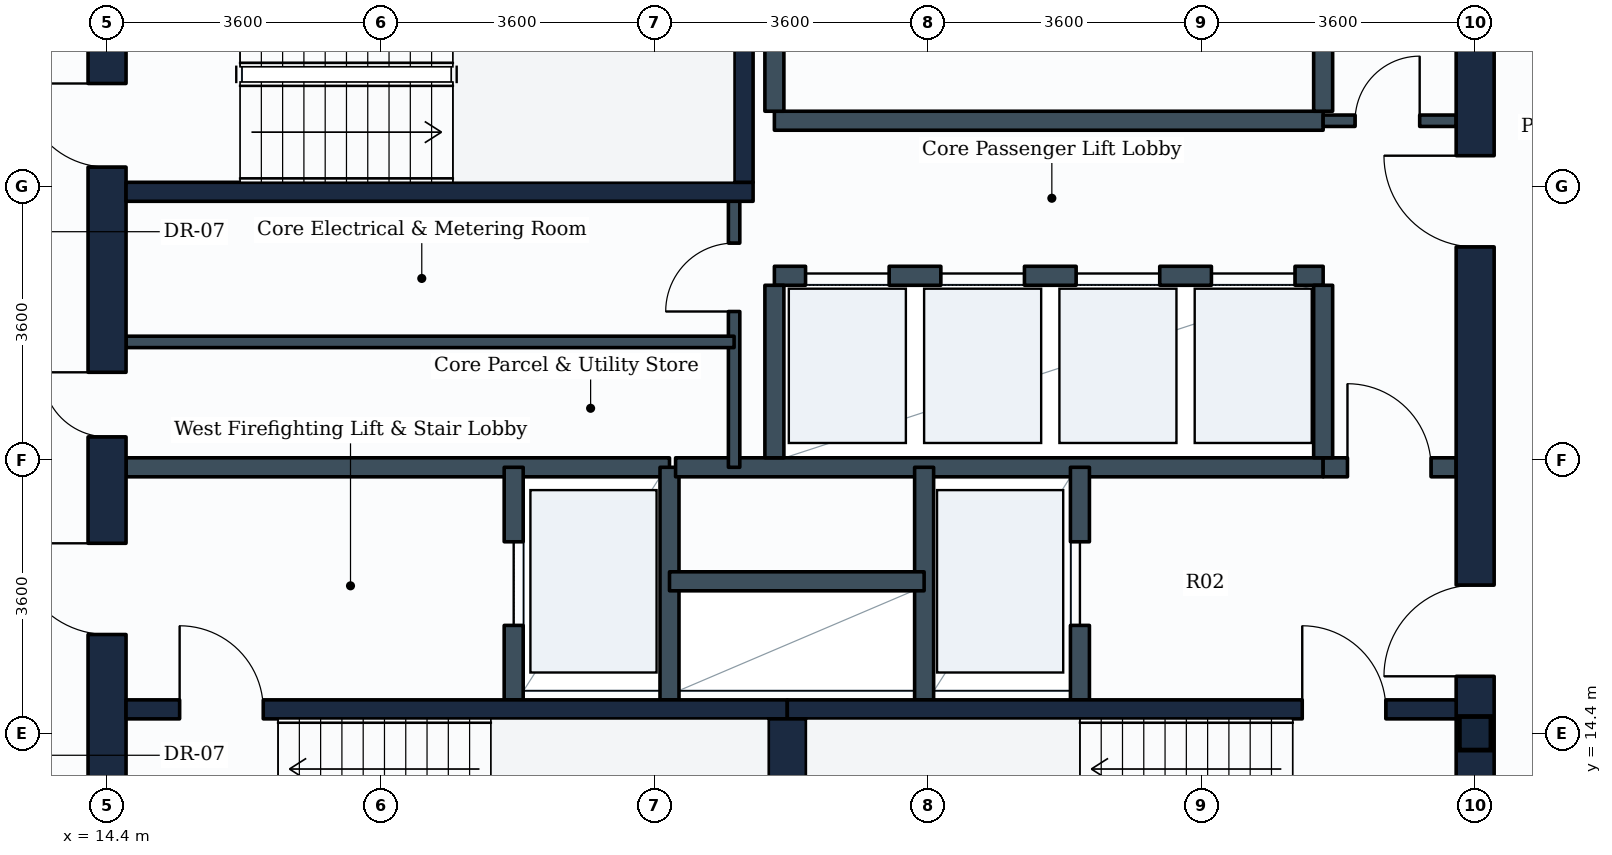
"""IFC4 building model, lengths in metres.
Left out: names, types, materials, properties, quantities, classifications, styles, units other than length and angle.
Written with IfcOpenShell. Run it as: python <this file> out.ifc"""

import sys

from ifc_helpers import new_model, si_unit, direction, frame, frame_2d, origin, origin_2d, place, context, subcontext, project, spatial, rectangle, i_section, extrude, element, fill, save


model = new_model("IFC4")
c1 = context("Model", 3, precision=1e-05, world=origin(), true_north=direction((0.0, 1.0)))
c2 = subcontext(c1, "Body", "Model", "MODEL_VIEW")
j1 = project(units=[si_unit("LENGTHUNIT", "METRE"), si_unit("PLANEANGLEUNIT", "RADIAN")], contexts=[c1])
p1 = place(None, origin())
s1 = spatial("IfcSite", under=j1, at=p1, CompositionType="ELEMENT")
p2 = place(p1, origin())
s2 = spatial("IfcBuilding", under=s1, at=p2, CompositionType="ELEMENT")
p3 = place(p2, frame((0.0, 0.0, 150.4)))
s3 = spatial("IfcBuildingStorey", under=s2, at=p3, CompositionType="ELEMENT", Elevation=150.4)
p4 = place(p3, frame((32.4, 14.4, 0.0), z_axis=(0.0, 0.0, 1.0), x_axis=(1.0, 0.0, 0.0)))
e1 = element("IfcColumn", 1, at=p4, inside=s3, PredefinedType="COLUMN", context=c2, shape_type="SweptSolid", body=[
    extrude(i_section(OverallWidth=0.416, OverallDepth=0.442, WebThickness=0.025, FlangeThickness=0.041, FilletRadius=0.015, at=origin_2d()), origin(), (0.0, 0.0, 1.0), 3.8),
])
p5 = place(p3, frame((14.4, 10.8, 0.0), z_axis=(0.0, 0.0, 1.0), x_axis=(0.0, 1.0, 0.0)))
e2 = element("IfcWall", 2, at=p5, inside=s3, PredefinedType="SHEAR", context=c2, shape_type="SweptSolid", body=[
    extrude(rectangle(XDim=14.4, YDim=0.5, at=frame_2d((7.2, 0.0))), origin(), (0.0, 0.0, 1.0), 3.55),
])
p6 = place(p5, frame((11.05, 0.0, 0.0)))
e3 = element("IfcOpeningElement", 3, at=p6, cuts=e2, PredefinedType="OPENING", context=c2, shape_type="SweptSolid", body=[
    extrude(rectangle(XDim=1.1, YDim=2.1, at=frame_2d((0.55, 1.05))), frame((0.0, 0.26, 0.0), z_axis=(0.0, -1.0, 0.0), x_axis=(1.0, 0.0, 0.0)), (0.0, 0.0, 1.0), 0.52),
])
p7 = place(p5, frame((4.9, 0.0, 0.0)))
e4 = element("IfcOpeningElement", 4, at=p7, cuts=e2, PredefinedType="OPENING", context=c2, shape_type="SweptSolid", body=[
    extrude(rectangle(XDim=1.2, YDim=2.1, at=frame_2d((0.6, 1.05))), frame((0.0, 0.26, 0.0), z_axis=(0.0, -1.0, 0.0), x_axis=(1.0, 0.0, 0.0)), (0.0, 0.0, 1.0), 0.52),
])
p8 = place(p5, frame((7.5, 0.0, 0.0)))
e5 = element("IfcOpeningElement", 5, at=p8, cuts=e2, PredefinedType="OPENING", context=c2, shape_type="SweptSolid", body=[
    extrude(rectangle(XDim=0.85, YDim=2.1, at=frame_2d((0.425, 1.05))), frame((0.0, 0.26, 0.0), z_axis=(0.0, -1.0, 0.0), x_axis=(1.0, 0.0, 0.0)), (0.0, 0.0, 1.0), 0.52),
])
p9 = place(p3, frame((32.4, 10.8, 0.0), z_axis=(0.0, 0.0, 1.0), x_axis=(0.0, 1.0, 0.0)))
e6 = element("IfcWall", 6, at=p9, inside=s3, PredefinedType="SHEAR", context=c2, shape_type="SweptSolid", body=[
    extrude(rectangle(XDim=14.4, YDim=0.5, at=frame_2d((7.2, 0.0))), origin(), (0.0, 0.0, 1.0), 3.55),
])
p10 = place(p9, frame((4.35, 0.0, 0.0)))
e7 = element("IfcOpeningElement", 7, at=p10, cuts=e6, PredefinedType="OPENING", context=c2, shape_type="SweptSolid", body=[
    extrude(rectangle(XDim=1.2, YDim=2.1, at=frame_2d((0.6, 1.05))), frame((0.0, 0.26, 0.0), z_axis=(0.0, -1.0, 0.0), x_axis=(1.0, 0.0, 0.0)), (0.0, 0.0, 1.0), 0.52),
])
p11 = place(p9, frame((10.0, 0.0, 0.0)))
e8 = element("IfcOpeningElement", 8, at=p11, cuts=e6, PredefinedType="OPENING", context=c2, shape_type="SweptSolid", body=[
    extrude(rectangle(XDim=1.2, YDim=2.1, at=frame_2d((0.6, 1.05))), frame((0.0, 0.26, 0.0), z_axis=(0.0, -1.0, 0.0), x_axis=(1.0, 0.0, 0.0)), (0.0, 0.0, 1.0), 0.52),
])
p12 = place(p3, frame((14.65, 14.715, 0.0), z_axis=(0.0, 0.0, 1.0), x_axis=(1.0, 0.0, 0.0)))
e9 = element("IfcWall", 9, at=p12, inside=s3, PredefinedType="SHEAR", context=c2, shape_type="SweptSolid", body=[
    extrude(rectangle(XDim=8.7, YDim=0.25, at=frame_2d((4.35, 0.0))), origin(), (0.0, 0.0, 1.0), 3.55),
])
p13 = place(p12, frame((0.705, 0.0, 0.0)))
e10 = element("IfcOpeningElement", 10, at=p13, cuts=e9, PredefinedType="OPENING", context=c2, shape_type="SweptSolid", body=[
    extrude(rectangle(XDim=1.1, YDim=2.1, at=frame_2d((0.55, 1.05))), frame((0.0, 0.135, 0.0), z_axis=(0.0, -1.0, 0.0), x_axis=(1.0, 0.0, 0.0)), (0.0, 0.0, 1.0), 0.27),
])
p14 = place(p3, frame((23.35, 14.715, 0.0), z_axis=(0.0, 0.0, 1.0), x_axis=(1.0, 0.0, 0.0)))
e11 = element("IfcWall", 11, at=p14, inside=s3, PredefinedType="SHEAR", context=c2, shape_type="SweptSolid", body=[
    extrude(rectangle(XDim=8.8, YDim=0.25, at=frame_2d((4.4, 0.0))), origin(), (0.0, 0.0, 1.0), 3.55),
])
p15 = place(p14, frame((6.775, 0.0, 0.0)))
e12 = element("IfcOpeningElement", 12, at=p15, cuts=e11, PredefinedType="OPENING", context=c2, shape_type="SweptSolid", body=[
    extrude(rectangle(XDim=1.1, YDim=2.1, at=frame_2d((0.55, 1.05))), frame((0.0, 0.135, 0.0), z_axis=(0.0, -1.0, 0.0), x_axis=(1.0, 0.0, 0.0)), (0.0, 0.0, 1.0), 0.27),
])
p16 = place(p3, frame((23.35, 11.75, 0.0), z_axis=(0.0, 0.0, 1.0), x_axis=(0.0, 1.0, 0.0)))
e13 = element("IfcWall", 13, at=p16, inside=s3, PredefinedType="SHEAR", context=c2, shape_type="SweptSolid", body=[
    extrude(rectangle(XDim=2.84, YDim=0.5, at=frame_2d((1.42, 0.0))), origin(), (0.0, 0.0, 1.0), 3.55),
])
p17 = place(p3, frame((14.65, 21.525, 0.0), z_axis=(0.0, 0.0, 1.0), x_axis=(1.0, 0.0, 0.0)))
e14 = element("IfcWall", 14, at=p17, inside=s3, PredefinedType="SHEAR", context=c2, shape_type="SweptSolid", body=[
    extrude(rectangle(XDim=8.25, YDim=0.25, at=frame_2d((4.125, 0.0))), origin(), (0.0, 0.0, 1.0), 3.55),
])
p18 = place(p3, frame((22.775, 21.65, 0.0), z_axis=(0.0, 0.0, 1.0), x_axis=(0.0, 1.0, 0.0)))
e15 = element("IfcWall", 15, at=p18, inside=s3, PredefinedType="SHEAR", context=c2, shape_type="SweptSolid", body=[
    extrude(rectangle(XDim=2.84, YDim=0.25, at=frame_2d((1.42, 0.0))), origin(), (0.0, 0.0, 1.0), 3.55),
])
p19 = place(p3, frame((14.65, 17.9, 0.0), z_axis=(0.0, 0.0, 1.0), x_axis=(1.0, 0.0, 0.0)))
e16 = element("IfcWall", 16, at=p19, inside=s3, PredefinedType="PARTITIONING", context=c2, shape_type="SweptSolid", body=[
    extrude(rectangle(XDim=7.15, YDim=0.25, at=frame_2d((3.575, 0.0))), origin(), (0.0, 0.0, 1.0), 3.535),
])
p20 = place(p3, frame((19.75, 14.84, 0.0), z_axis=(0.0, 0.0, 1.0), x_axis=(0.0, 1.0, 0.0)))
e17 = element("IfcWall", 17, at=p20, inside=s3, PredefinedType="PARTITIONING", context=c2, shape_type="SweptSolid", body=[
    extrude(rectangle(XDim=3.06, YDim=0.25, at=frame_2d((1.53, 0.0))), origin(), (0.0, 0.0, 1.0), 3.535),
])
p21 = place(p20, frame((0.98, 0.0, 0.0)))
e18 = element("IfcOpeningElement", 18, at=p21, cuts=e17, PredefinedType="OPENING", context=c2, shape_type="SweptSolid", body=[
    extrude(rectangle(XDim=1.1, YDim=2.1, at=frame_2d((0.55, 1.05))), frame((0.0, 0.135, 0.0), z_axis=(0.0, -1.0, 0.0), x_axis=(1.0, 0.0, 0.0)), (0.0, 0.0, 1.0), 0.27),
])
p22 = place(p3, frame((21.8, 14.84, 0.0), z_axis=(0.0, 0.0, 1.0), x_axis=(0.0, 1.0, 0.0)))
e19 = element("IfcWall", 19, at=p22, inside=s3, PredefinedType="PARTITIONING", context=c2, shape_type="SweptSolid", body=[
    extrude(rectangle(XDim=3.06, YDim=0.25, at=frame_2d((1.53, 0.0))), origin(), (0.0, 0.0, 1.0), 3.535),
])
p23 = place(p3, frame((21.88, 17.9, 0.0), z_axis=(0.0, 0.0, 1.0), x_axis=(1.0, 0.0, 0.0)))
e20 = element("IfcWall", 20, at=p23, inside=s3, PredefinedType="PARTITIONING", context=c2, shape_type="SweptSolid", body=[
    extrude(rectangle(XDim=8.52, YDim=0.25, at=frame_2d((4.26, 0.0))), origin(), (0.0, 0.0, 1.0), 3.535),
])
p24 = place(p3, frame((30.4, 17.9, 0.0), z_axis=(0.0, 0.0, 1.0), x_axis=(1.0, 0.0, 0.0)))
e21 = element("IfcWall", 21, at=p24, inside=s3, PredefinedType="PARTITIONING", context=c2, shape_type="SweptSolid", body=[
    extrude(rectangle(XDim=1.75, YDim=0.25, at=frame_2d((0.875, 0.0))), origin(), (0.0, 0.0, 1.0), 3.535),
])
p25 = place(p24, frame((0.32, 0.0, 0.0)))
e22 = element("IfcOpeningElement", 22, at=p25, cuts=e21, PredefinedType="OPENING", context=c2, shape_type="SweptSolid", body=[
    extrude(rectangle(XDim=1.1, YDim=2.1, at=frame_2d((0.55, 1.05))), frame((0.0, 0.135, 0.0), z_axis=(0.0, -1.0, 0.0), x_axis=(1.0, 0.0, 0.0)), (0.0, 0.0, 1.0), 0.27),
])
p26 = place(p3, frame((25.15, 14.84, 0.0), z_axis=(0.0, 0.0, 1.0), x_axis=(0.0, 1.0, 0.0)))
e23 = element("IfcWall", 23, at=p26, inside=s3, PredefinedType="PARTITIONING", context=c2, shape_type="SweptSolid", body=[
    extrude(rectangle(XDim=3.06, YDim=0.25, at=frame_2d((1.53, 0.0))), origin(), (0.0, 0.0, 1.0), 3.535),
])
p27 = place(p3, frame((27.2, 14.84, 0.0), z_axis=(0.0, 0.0, 1.0), x_axis=(0.0, 1.0, 0.0)))
e24 = element("IfcWall", 24, at=p27, inside=s3, PredefinedType="PARTITIONING", context=c2, shape_type="SweptSolid", body=[
    extrude(rectangle(XDim=3.06, YDim=0.25, at=frame_2d((1.53, 0.0))), origin(), (0.0, 0.0, 1.0), 3.535),
])
p28 = place(p27, frame((0.98, 0.0, 0.0)))
e25 = element("IfcOpeningElement", 25, at=p28, cuts=e24, PredefinedType="OPENING", context=c2, shape_type="SweptSolid", body=[
    extrude(rectangle(XDim=1.1, YDim=2.1, at=frame_2d((0.55, 1.05))), frame((0.0, 0.135, 0.0), z_axis=(0.0, -1.0, 0.0), x_axis=(1.0, 0.0, 0.0)), (0.0, 0.0, 1.0), 0.27),
])
p29 = place(p3, frame((21.8, 16.4, 0.0), z_axis=(0.0, 0.0, 1.0), x_axis=(1.0, 0.0, 0.0)))
e26 = element("IfcWall", 26, at=p29, inside=s3, PredefinedType="PARTITIONING", context=c2, shape_type="SweptSolid", body=[
    extrude(rectangle(XDim=3.35, YDim=0.25, at=frame_2d((1.675, 0.0))), origin(), (0.0, 0.0, 1.0), 3.535),
])
p30 = place(p3, frame((23.18, 20.42, 0.0), z_axis=(0.0, 0.0, 1.0), x_axis=(1.0, 0.0, 0.0)))
e27 = element("IfcWall", 27, at=p30, inside=s3, PredefinedType="PARTITIONING", context=c2, shape_type="SweptSolid", body=[
    extrude(rectangle(XDim=7.22, YDim=0.25, at=frame_2d((3.61, 0.0))), origin(), (0.0, 0.0, 1.0), 3.535),
])
p31 = place(p30, frame((0.41, 0.0, 0.0)))
e28 = element("IfcOpeningElement", 28, at=p31, cuts=e27, PredefinedType="OPENING", context=c2, shape_type="SweptSolid", body=[
    extrude(rectangle(XDim=1.1, YDim=2.1, at=frame_2d((0.55, 1.05))), frame((0.0, 0.135, 0.0), z_axis=(0.0, -1.0, 0.0), x_axis=(1.0, 0.0, 0.0)), (0.0, 0.0, 1.0), 0.27),
])
p32 = place(p30, frame((2.19, 0.0, 0.0)))
e29 = element("IfcOpeningElement", 29, at=p32, cuts=e27, PredefinedType="OPENING", context=c2, shape_type="SweptSolid", body=[
    extrude(rectangle(XDim=1.1, YDim=2.1, at=frame_2d((0.55, 1.05))), frame((0.0, 0.135, 0.0), z_axis=(0.0, -1.0, 0.0), x_axis=(1.0, 0.0, 0.0)), (0.0, 0.0, 1.0), 0.27),
])
p33 = place(p30, frame((3.97, 0.0, 0.0)))
e30 = element("IfcOpeningElement", 30, at=p33, cuts=e27, PredefinedType="OPENING", context=c2, shape_type="SweptSolid", body=[
    extrude(rectangle(XDim=1.1, YDim=2.1, at=frame_2d((0.55, 1.05))), frame((0.0, 0.135, 0.0), z_axis=(0.0, -1.0, 0.0), x_axis=(1.0, 0.0, 0.0)), (0.0, 0.0, 1.0), 0.27),
])
p34 = place(p30, frame((5.75, 0.0, 0.0)))
e31 = element("IfcOpeningElement", 31, at=p34, cuts=e27, PredefinedType="OPENING", context=c2, shape_type="SweptSolid", body=[
    extrude(rectangle(XDim=1.1, YDim=2.1, at=frame_2d((0.55, 1.05))), frame((0.0, 0.135, 0.0), z_axis=(0.0, -1.0, 0.0), x_axis=(1.0, 0.0, 0.0)), (0.0, 0.0, 1.0), 0.27),
])
for number, where, z_axis, x_axis in (
    (32, (23.18, 18.025, 0.0), (0.0, 0.0, 1.0), (0.0, 1.0, 0.0)),
    (33, (30.4, 18.025, 0.0), (0.0, 0.0, 1.0), (0.0, 1.0, 0.0)),
):
    element("IfcWall", number, at=place(p3, frame(where, z_axis=z_axis, x_axis=x_axis)), inside=s3, PredefinedType="PARTITIONING", context=c2, shape_type="SweptSolid", body=[
        extrude(rectangle(XDim=2.27, YDim=0.25, at=frame_2d((1.135, 0.0))), origin(), (0.0, 0.0, 1.0), 3.535),
    ])
p35 = place(p3, frame((23.18, 22.46, 0.0), z_axis=(0.0, 0.0, 1.0), x_axis=(1.0, 0.0, 0.0)))
e34 = element("IfcWall", 34, at=p35, inside=s3, PredefinedType="PARTITIONING", context=c2, shape_type="SweptSolid", body=[
    extrude(rectangle(XDim=7.22, YDim=0.25, at=frame_2d((3.61, 0.0))), origin(), (0.0, 0.0, 1.0), 3.535),
])
for number, where, z_axis, x_axis in (
    (35, (23.18, 22.585, 0.0), (0.0, 0.0, 1.0), (0.0, 1.0, 0.0)),
    (36, (30.4, 22.585, 0.0), (0.0, 0.0, 1.0), (0.0, 1.0, 0.0)),
):
    element("IfcWall", number, at=place(p3, frame(where, z_axis=z_axis, x_axis=x_axis)), inside=s3, PredefinedType="PARTITIONING", context=c2, shape_type="SweptSolid", body=[
        extrude(rectangle(XDim=2.315, YDim=0.25, at=frame_2d((1.157, 0.0))), origin(), (0.0, 0.0, 1.0), 3.535),
    ])
p36 = place(p3, frame((22.65, 17.9, 0.0), z_axis=(0.0, 0.0, 1.0), x_axis=(0.0, 1.0, 0.0)))
e37 = element("IfcWall", 37, at=p36, inside=s3, PredefinedType="PARTITIONING", context=c2, shape_type="SweptSolid", body=[
    extrude(rectangle(XDim=3.625, YDim=0.15, at=frame_2d((1.812, 0.0))), origin(), (0.0, 0.0, 1.0), 3.535),
])
p37 = place(p36, frame((2.05, 0.0, 0.0)))
e38 = element("IfcOpeningElement", 38, at=p37, cuts=e37, PredefinedType="OPENING", context=c2, shape_type="SweptSolid", body=[
    extrude(rectangle(XDim=0.9, YDim=2.1, at=frame_2d((0.45, 1.05))), frame((0.0, 0.085, 0.0), z_axis=(0.0, -1.0, 0.0), x_axis=(1.0, 0.0, 0.0)), (0.0, 0.0, 1.0), 0.17),
])
p38 = place(p3, frame((14.65, 19.55, 0.0), z_axis=(0.0, 0.0, 1.0), x_axis=(1.0, 0.0, 0.0)))
e39 = element("IfcWall", 39, at=p38, inside=s3, PredefinedType="PARTITIONING", context=c2, shape_type="SweptSolid", body=[
    extrude(rectangle(XDim=8.0, YDim=0.15, at=frame_2d((4.0, 0.0))), origin(), (0.0, 0.0, 1.0), 3.535),
])
p39 = place(p3, frame((30.4, 22.46, 0.0), z_axis=(0.0, 0.0, 1.0), x_axis=(1.0, 0.0, 0.0)))
e40 = element("IfcWall", 40, at=p39, inside=s3, PredefinedType="PARTITIONING", context=c2, shape_type="SweptSolid", body=[
    extrude(rectangle(XDim=1.75, YDim=0.15, at=frame_2d((0.875, 0.0))), origin(), (0.0, 0.0, 1.0), 3.535),
])
p40 = place(p39, frame((0.42, 0.0, 0.0)))
e41 = element("IfcOpeningElement", 41, at=p40, cuts=e40, PredefinedType="OPENING", context=c2, shape_type="SweptSolid", body=[
    extrude(rectangle(XDim=0.85, YDim=2.1, at=frame_2d((0.425, 1.05))), frame((0.0, 0.085, 0.0), z_axis=(0.0, -1.0, 0.0), x_axis=(1.0, 0.0, 0.0)), (0.0, 0.0, 1.0), 0.17),
])
p41 = place(p13, origin())
e42 = element("IfcDoor", 42, at=p41, inside=s3, OperationType="SINGLE_SWING_LEFT", PredefinedType="DOOR", context=c2, shape_type="SweptSolid", body=[
    extrude(rectangle(XDim=1.1, YDim=2.1, at=frame_2d((0.55, 1.05))), frame((0.0, 0.025, 0.0), z_axis=(0.0, -1.0, 0.0), x_axis=(1.0, 0.0, 0.0)), (0.0, 0.0, 1.0), 0.05),
])
fill(e10, e42)
p42 = place(p15, origin())
e43 = element("IfcDoor", 43, at=p42, inside=s3, OperationType="SINGLE_SWING_LEFT", PredefinedType="DOOR", context=c2, shape_type="SweptSolid", body=[
    extrude(rectangle(XDim=1.1, YDim=2.1, at=frame_2d((0.55, 1.05))), frame((0.0, 0.025, 0.0), z_axis=(0.0, -1.0, 0.0), x_axis=(1.0, 0.0, 0.0)), (0.0, 0.0, 1.0), 0.05),
])
fill(e12, e43)
p43 = place(p6, origin())
e44 = element("IfcDoor", 44, at=p43, inside=s3, OperationType="SINGLE_SWING_RIGHT", PredefinedType="DOOR", context=c2, shape_type="SweptSolid", body=[
    extrude(rectangle(XDim=1.1, YDim=2.1, at=frame_2d((0.55, 1.05))), frame((0.0, 0.025, 0.0), z_axis=(0.0, -1.0, 0.0), x_axis=(1.0, 0.0, 0.0)), (0.0, 0.0, 1.0), 0.05),
])
fill(e3, e44)
p44 = place(p21, origin())
e45 = element("IfcDoor", 45, at=p44, inside=s3, OperationType="SLIDING_TO_LEFT", PredefinedType="DOOR", context=c2, shape_type="SweptSolid", body=[
    extrude(rectangle(XDim=1.1, YDim=2.1, at=frame_2d((0.55, 1.05))), frame((0.0, 0.025, 0.0), z_axis=(0.0, -1.0, 0.0), x_axis=(1.0, 0.0, 0.0)), (0.0, 0.0, 1.0), 0.05),
])
fill(e18, e45)
p45 = place(p28, origin())
e46 = element("IfcDoor", 46, at=p45, inside=s3, OperationType="SLIDING_TO_LEFT", PredefinedType="DOOR", context=c2, shape_type="SweptSolid", body=[
    extrude(rectangle(XDim=1.1, YDim=2.1, at=frame_2d((0.55, 1.05))), frame((0.0, 0.025, 0.0), z_axis=(0.0, -1.0, 0.0), x_axis=(1.0, 0.0, 0.0)), (0.0, 0.0, 1.0), 0.05),
])
fill(e25, e46)
p46 = place(p7, origin())
e47 = element("IfcDoor", 47, at=p46, inside=s3, OperationType="SINGLE_SWING_RIGHT", PredefinedType="DOOR", context=c2, shape_type="SweptSolid", body=[
    extrude(rectangle(XDim=1.2, YDim=2.1, at=frame_2d((0.6, 1.05))), frame((0.0, 0.025, 0.0), z_axis=(0.0, -1.0, 0.0), x_axis=(1.0, 0.0, 0.0)), (0.0, 0.0, 1.0), 0.05),
])
fill(e4, e47)
p47 = place(p10, origin())
e48 = element("IfcDoor", 48, at=p47, inside=s3, OperationType="SINGLE_SWING_LEFT", PredefinedType="DOOR", context=c2, shape_type="SweptSolid", body=[
    extrude(rectangle(XDim=1.2, YDim=2.1, at=frame_2d((0.6, 1.05))), frame((0.0, 0.025, 0.0), z_axis=(0.0, -1.0, 0.0), x_axis=(1.0, 0.0, 0.0)), (0.0, 0.0, 1.0), 0.05),
])
fill(e7, e48)
p48 = place(p25, origin())
e49 = element("IfcDoor", 49, at=p48, inside=s3, OperationType="SINGLE_SWING_LEFT", PredefinedType="DOOR", context=c2, shape_type="SweptSolid", body=[
    extrude(rectangle(XDim=1.1, YDim=2.1, at=frame_2d((0.55, 1.05))), frame((0.0, 0.025, 0.0), z_axis=(0.0, -1.0, 0.0), x_axis=(1.0, 0.0, 0.0)), (0.0, 0.0, 1.0), 0.05),
])
fill(e22, e49)
p49 = place(p31, origin())
e50 = element("IfcDoor", 50, at=p49, inside=s3, OperationType="SLIDING_TO_LEFT", PredefinedType="DOOR", context=c2, shape_type="SweptSolid", body=[
    extrude(rectangle(XDim=1.1, YDim=2.1, at=frame_2d((0.55, 1.05))), frame((0.0, 0.025, 0.0), z_axis=(0.0, -1.0, 0.0), x_axis=(1.0, 0.0, 0.0)), (0.0, 0.0, 1.0), 0.05),
])
fill(e28, e50)
p50 = place(p32, origin())
e51 = element("IfcDoor", 51, at=p50, inside=s3, OperationType="SLIDING_TO_LEFT", PredefinedType="DOOR", context=c2, shape_type="SweptSolid", body=[
    extrude(rectangle(XDim=1.1, YDim=2.1, at=frame_2d((0.55, 1.05))), frame((0.0, 0.025, 0.0), z_axis=(0.0, -1.0, 0.0), x_axis=(1.0, 0.0, 0.0)), (0.0, 0.0, 1.0), 0.05),
])
fill(e29, e51)
p51 = place(p33, origin())
e52 = element("IfcDoor", 52, at=p51, inside=s3, OperationType="SLIDING_TO_LEFT", PredefinedType="DOOR", context=c2, shape_type="SweptSolid", body=[
    extrude(rectangle(XDim=1.1, YDim=2.1, at=frame_2d((0.55, 1.05))), frame((0.0, 0.025, 0.0), z_axis=(0.0, -1.0, 0.0), x_axis=(1.0, 0.0, 0.0)), (0.0, 0.0, 1.0), 0.05),
])
fill(e30, e52)
p52 = place(p34, origin())
e53 = element("IfcDoor", 53, at=p52, inside=s3, OperationType="SLIDING_TO_LEFT", PredefinedType="DOOR", context=c2, shape_type="SweptSolid", body=[
    extrude(rectangle(XDim=1.1, YDim=2.1, at=frame_2d((0.55, 1.05))), frame((0.0, 0.025, 0.0), z_axis=(0.0, -1.0, 0.0), x_axis=(1.0, 0.0, 0.0)), (0.0, 0.0, 1.0), 0.05),
])
fill(e31, e53)
p53 = place(p11, origin())
e54 = element("IfcDoor", 54, at=p53, inside=s3, OperationType="SINGLE_SWING_RIGHT", PredefinedType="DOOR", context=c2, shape_type="SweptSolid", body=[
    extrude(rectangle(XDim=1.2, YDim=2.1, at=frame_2d((0.6, 1.05))), frame((0.0, 0.025, 0.0), z_axis=(0.0, -1.0, 0.0), x_axis=(1.0, 0.0, 0.0)), (0.0, 0.0, 1.0), 0.05),
])
fill(e8, e54)
p54 = place(p8, origin())
e55 = element("IfcDoor", 55, at=p54, inside=s3, OperationType="SINGLE_SWING_RIGHT", PredefinedType="DOOR", context=c2, shape_type="SweptSolid", body=[
    extrude(rectangle(XDim=0.85, YDim=2.1, at=frame_2d((0.425, 1.05))), frame((0.0, 0.025, 0.0), z_axis=(0.0, -1.0, 0.0), x_axis=(1.0, 0.0, 0.0)), (0.0, 0.0, 1.0), 0.05),
])
fill(e5, e55)
p55 = place(p37, origin())
e56 = element("IfcDoor", 56, at=p55, inside=s3, OperationType="SINGLE_SWING_LEFT", PredefinedType="DOOR", context=c2, shape_type="SweptSolid", body=[
    extrude(rectangle(XDim=0.9, YDim=2.1, at=frame_2d((0.45, 1.05))), frame((0.0, 0.025, 0.0), z_axis=(0.0, -1.0, 0.0), x_axis=(1.0, 0.0, 0.0)), (0.0, 0.0, 1.0), 0.05),
])
fill(e38, e56)
p56 = place(p40, origin())
e57 = element("IfcDoor", 57, at=p56, inside=s3, OperationType="SINGLE_SWING_RIGHT", PredefinedType="DOOR", context=c2, shape_type="SweptSolid", body=[
    extrude(rectangle(XDim=0.85, YDim=2.1, at=frame_2d((0.425, 1.05))), frame((0.0, 0.025, 0.0), z_axis=(0.0, -1.0, 0.0), x_axis=(1.0, 0.0, 0.0)), (0.0, 0.0, 1.0), 0.05),
])
fill(e41, e57)
save(model, sys.argv[1])
